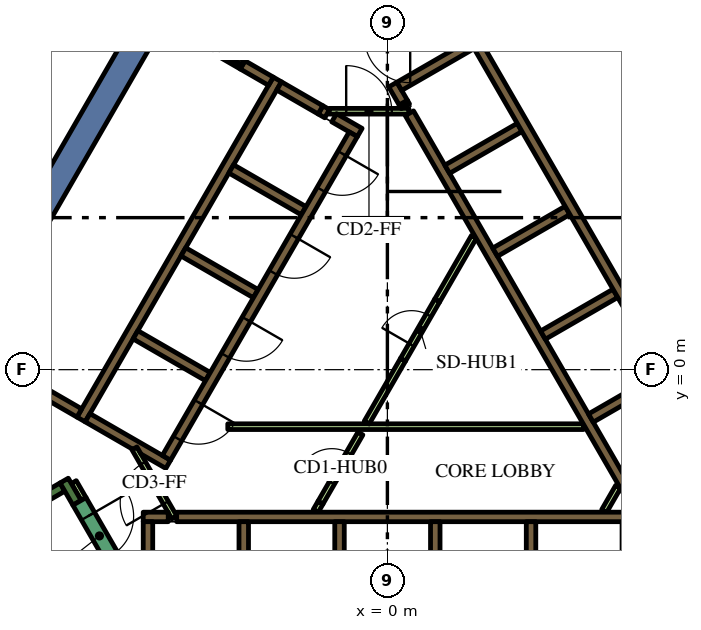
"""IFC4 building model, lengths in metres.
Left out: names, types, materials, properties, quantities, classifications, styles, units other than length and angle.
Written with IfcOpenShell. Run it as: python <this file> out.ifc"""

import sys

from ifc_helpers import new_model, si_unit, direction, frame, frame_2d, origin, place, context, subcontext, project, spatial, polyline, rectangle, outline, extrude, element, fill, save


model = new_model("IFC4")
c1 = context("Model", 3, precision=1e-05, world=origin(), true_north=direction((0.0, 1.0)))
c2 = subcontext(c1, "Body", "Model", "MODEL_VIEW")
j1 = project(units=[si_unit("LENGTHUNIT", "METRE"), si_unit("PLANEANGLEUNIT", "RADIAN")], contexts=[c1])
p1 = place(None, origin())
s1 = spatial("IfcSite", under=j1, at=p1, CompositionType="ELEMENT")
p2 = place(p1, origin())
s2 = spatial("IfcBuilding", under=s1, at=p2, CompositionType="ELEMENT")
p3 = place(p2, frame((0.0, 0.0, 243.6)))
s3 = spatial("IfcBuildingStorey", under=s2, at=p3, CompositionType="ELEMENT", Elevation=243.6)
p4 = place(p3, frame((8.235, 5.736, 0.0), z_axis=(0.0, 0.0, 1.0), x_axis=(-0.499983401189, 0.8660349869, 0.0)))
e1 = element("IfcWall", 1, at=p4, inside=s3, PredefinedType="SOLIDWALL", context=c2, shape_type="SweptSolid", body=[
    extrude(rectangle(XDim=12.472, YDim=0.7, at=frame_2d((6.236, 0.0))), origin(), (0.0, 0.0, 1.0), 4.2),
])
p5 = place(p3, frame((-12.625, -1.867, 0.0), z_axis=(0.0, 0.0, 1.0), x_axis=(0.499996974394, 0.866027150612, 0.0)))
e2 = element("IfcWall", 2, at=p5, inside=s3, PredefinedType="SOLIDWALL", context=c2, shape_type="SweptSolid", body=[
    extrude(rectangle(XDim=15.858, YDim=0.7, at=frame_2d((7.929, 0.0))), origin(), (0.0, 0.0, 1.0), 4.2),
])
p6 = place(p3, frame((-14.44, -6.49, 0.0), z_axis=(0.0, 0.0, 1.0), x_axis=(0.866022966069, 0.500004222222, 0.0)))
e3 = element("IfcWall", 3, at=p6, inside=s3, PredefinedType="SOLIDWALL", context=c2, shape_type="SweptSolid", body=[
    extrude(rectangle(XDim=6.8, YDim=0.25, at=frame_2d((3.4, 0.0))), origin(), (0.0, 0.0, 1.0), 4.2),
])
p7 = place(p3, frame((-8.168, -3.503, 0.0), z_axis=(0.0, 0.0, 1.0), x_axis=(-0.499952099219, 0.866053057547, 0.0)))
e4 = element("IfcWall", 4, at=p7, inside=s3, PredefinedType="SOLIDWALL", context=c2, shape_type="SweptSolid", body=[
    extrude(rectangle(XDim=0.675, YDim=0.25, at=frame_2d((0.337, 0.0))), origin(), (0.0, 0.0, 1.0), 4.2),
])
p8 = place(p3, frame((-5.545, -3.875, 0.0), z_axis=(0.0, 0.0, 1.0), x_axis=(1.0, 0.0, 0.0)))
e5 = element("IfcWall", 5, at=p8, inside=s3, PredefinedType="SOLIDWALL", context=c2, shape_type="SweptSolid", body=[
    extrude(rectangle(XDim=11.97, YDim=0.25, at=frame_2d((5.985, 0.0))), origin(), (0.0, 0.0, 1.0), 4.2),
])
p9 = place(p3, frame((-6.425, -3.875, 0.0), z_axis=(0.0, 0.0, 1.0), x_axis=(1.0, 0.0, 0.0)))
e6 = element("IfcWall", 6, at=p9, inside=s3, PredefinedType="SOLIDWALL", context=c2, shape_type="SweptSolid", body=[
    extrude(rectangle(XDim=0.658, YDim=0.25, at=frame_2d((0.329, 0.0))), origin(), (0.0, 0.0, 1.0), 4.2),
])
for number, where, z_axis, x_axis in (
    (7, (3.78, -4.0, 0.0), (0.0, 0.0, 1.0), (0.0, -1.0, 0.0)),
    (8, (1.26, -4.0, 0.0), (0.0, 0.0, 1.0), (0.0, -1.0, 0.0)),
    (9, (-1.26, -4.0, 0.0), (0.0, 0.0, 1.0), (0.0, -1.0, 0.0)),
    (10, (-3.78, -4.0, 0.0), (0.0, 0.0, 1.0), (0.0, -1.0, 0.0)),
):
    element("IfcWall", number, at=place(p3, frame(where, z_axis=z_axis, x_axis=x_axis)), inside=s3, PredefinedType="SOLIDWALL", context=c2, shape_type="SweptSolid", body=[
        extrude(rectangle(XDim=2.2, YDim=0.25, at=frame_2d((1.1, 0.0))), origin(), (0.0, 0.0, 1.0), 4.2),
    ])
p10 = place(p3, frame((-6.3, -7.125, 0.0), z_axis=(0.0, 0.0, 1.0), x_axis=(0.0, 1.0, 0.0)))
e11 = element("IfcWall", 11, at=p10, inside=s3, PredefinedType="SOLIDWALL", context=c2, shape_type="SweptSolid", body=[
    extrude(rectangle(XDim=3.125, YDim=0.25, at=frame_2d((1.562, 0.0))), origin(), (0.0, 0.0, 1.0), 4.2),
])
p11 = place(p3, frame((0.473, 6.93, 0.0), z_axis=(0.0, 0.0, 1.0), x_axis=(-0.49972245349, 0.866185586049, 0.0)))
e12 = element("IfcWall", 12, at=p11, inside=s3, PredefinedType="SOLIDWALL", context=c2, shape_type="SweptSolid", body=[
    extrude(rectangle(XDim=0.11, YDim=0.25, at=frame_2d((0.055, 0.0))), origin(), (0.0, 0.0, 1.0), 4.2),
])
p12 = place(p3, frame((6.568, -3.627, 0.0), z_axis=(0.0, 0.0, 1.0), x_axis=(-0.499999455981, 0.866025717874, 0.0)))
e13 = element("IfcWall", 13, at=p12, inside=s3, PredefinedType="SOLIDWALL", context=c2, shape_type="SweptSolid", body=[
    extrude(rectangle(XDim=11.978, YDim=0.25, at=frame_2d((5.989, 0.0))), origin(), (0.0, 0.0, 1.0), 4.2),
])
p13 = place(p3, frame((0.417, 7.027, 0.0), z_axis=(0.0, 0.0, 1.0), x_axis=(-0.500210807569, 0.865903659763, 0.0)))
e14 = element("IfcWall", 14, at=p13, inside=s3, PredefinedType="SOLIDWALL", context=c2, shape_type="SweptSolid", body=[
    extrude(rectangle(XDim=0.548, YDim=0.25, at=frame_2d((0.274, 0.0))), origin(), (0.0, 0.0, 1.0), 4.2),
])
p14 = place(p3, frame((3.1, 9.064, 0.0), z_axis=(0.0, 0.0, 1.0), x_axis=(-0.866030133475, -0.499991807846, 0.0)))
e15 = element("IfcWall", 15, at=p14, inside=s3, PredefinedType="SOLIDWALL", context=c2, shape_type="SweptSolid", body=[
    extrude(rectangle(XDim=3.217, YDim=0.25, at=frame_2d((1.608, 0.0))), origin(), (0.0, 0.0, 1.0), 4.2),
])
p15 = place(p3, frame((1.574, 5.274, 0.0), z_axis=(0.0, 0.0, 1.0), x_axis=(0.866028486751, 0.499994660107, 0.0)))
e16 = element("IfcWall", 16, at=p15, inside=s3, PredefinedType="SOLIDWALL", context=c2, shape_type="SweptSolid", body=[
    extrude(rectangle(XDim=2.2, YDim=0.25, at=frame_2d((1.1, 0.0))), origin(), (0.0, 0.0, 1.0), 4.2),
])
for number, where, z_axis, x_axis in (
    (17, (2.834, 3.091, 0.0), (0.0, 0.0, 1.0), (0.866, 0.5, 0.0)),
    (18, (4.094, 0.909, 0.0), (0.0, 0.0, 1.0), (0.866, 0.5, 0.0)),
    (19, (5.354, -1.274, 0.0), (0.0, 0.0, 1.0), (0.866, 0.5, 0.0)),
):
    element("IfcWall", number, at=place(p3, frame(where, z_axis=z_axis, x_axis=x_axis)), inside=s3, PredefinedType="SOLIDWALL", context=c2, shape_type="SweptSolid", body=[
        extrude(rectangle(XDim=2.2, YDim=0.25, at=frame_2d((1.1, 0.0))), origin(), (0.0, 0.0, 1.0), 4.2),
    ])
p16 = place(p3, frame((-8.06, -1.311, 0.0), z_axis=(0.0, 0.0, 1.0), x_axis=(0.50000273126, 0.866023826885, 0.0)))
e20 = element("IfcWall", 20, at=p16, inside=s3, PredefinedType="SOLIDWALL", context=c2, shape_type="SweptSolid", body=[
    extrude(rectangle(XDim=10.33, YDim=0.25, at=frame_2d((5.165, 0.0))), origin(), (0.0, 0.0, 1.0), 4.2),
])
p17 = place(p3, frame((-1.758, 6.835, 0.0), z_axis=(0.0, 0.0, 1.0), x_axis=(0.865982457891, -0.500074377092, 0.0)))
e21 = element("IfcWall", 21, at=p17, inside=s3, PredefinedType="SOLIDWALL", context=c2, shape_type="SweptSolid", body=[
    extrude(rectangle(XDim=0.2, YDim=0.25, at=frame_2d((0.1, 0.0))), origin(), (0.0, 0.0, 1.0), 4.2),
])
p18 = place(p3, frame((-1.76, 6.836, 0.0), z_axis=(0.0, 0.0, 1.0), x_axis=(-0.865952863304, 0.500125622755, 0.0)))
e22 = element("IfcWall", 22, at=p18, inside=s3, PredefinedType="SOLIDWALL", context=c2, shape_type="SweptSolid", body=[
    extrude(rectangle(XDim=1.258, YDim=0.25, at=frame_2d((0.629, 0.0))), origin(), (0.0, 0.0, 1.0), 4.2),
])
p19 = place(p3, frame((-0.728, 6.24, 0.0), z_axis=(0.0, 0.0, 1.0), x_axis=(-0.865955664968, 0.500120771724, 0.0)))
e23 = element("IfcWall", 23, at=p19, inside=s3, PredefinedType="SOLIDWALL", context=c2, shape_type="SweptSolid", body=[
    extrude(rectangle(XDim=0.778, YDim=0.25, at=frame_2d((0.389, 0.0))), origin(), (0.0, 0.0, 1.0), 4.2),
])
for number, where, z_axis, x_axis in (
    (24, (-2.204, 4.182, 0.0), (0.0, 0.0, 1.0), (-0.866, 0.5, 0.0)),
    (25, (-5.369, 3.1, 0.0), (0.0, 0.0, 1.0), (0.866, -0.5, 0.0)),
    (26, (-4.724, -0.182, 0.0), (0.0, 0.0, 1.0), (-0.866, 0.5, 0.0)),
):
    element("IfcWall", number, at=place(p3, frame(where, z_axis=z_axis, x_axis=x_axis)), inside=s3, PredefinedType="SOLIDWALL", context=c2, shape_type="SweptSolid", body=[
        extrude(rectangle(XDim=2.2, YDim=0.25, at=frame_2d((1.1, 0.0))), origin(), (0.0, 0.0, 1.0), 4.2),
    ])
p20 = place(p3, origin())
e27 = element("IfcWall", 27, at=p20, inside=s3, PredefinedType="SOLIDWALL", context=c2, shape_type="SweptSolid", body=[
    extrude(outline(polyline([(-5.922, -2.257), (-5.922, -2.257), (-5.705, -2.382), (-5.83, -2.598), (-6.483, -2.221), (-6.591, -2.033), (-6.591, -2.033), (-6.7, -2.096), (-7.952, -1.373), (-7.827, -1.156), (-5.922, -2.257)])), origin(), (0.0, 0.0, 1.0), 4.2),
])
p21 = place(p3, frame((-8.106, -1.14, 0.0), z_axis=(0.0, 0.0, 1.0), x_axis=(-0.866008981251, 0.500028443584, 0.0)))
e28 = element("IfcWall", 28, at=p21, inside=s3, PredefinedType="SOLIDWALL", context=c2, shape_type="SweptSolid", body=[
    extrude(rectangle(XDim=3.2, YDim=0.25, at=frame_2d((1.6, 0.0))), origin(), (0.0, 0.0, 1.0), 4.2),
])
p22 = place(p3, frame((-3.066, 7.59, 0.0), z_axis=(0.0, 0.0, 1.0), x_axis=(-0.866081358704, 0.49990307071, 0.0)))
e29 = element("IfcWall", 29, at=p22, inside=s3, PredefinedType="SOLIDWALL", context=c2, shape_type="SweptSolid", body=[
    extrude(rectangle(XDim=0.858, YDim=0.25, at=frame_2d((0.429, 0.0))), origin(), (0.0, 0.0, 1.0), 4.2),
])
e30 = element("IfcWall", 30, at=p20, inside=s3, PredefinedType="SOLIDWALL", context=c2, shape_type="SweptSolid", body=[
    extrude(outline(polyline([(-3.748, 8.128), (-3.813, 8.015), (-4.027, 8.139), (-4.017, 8.156), (-4.008, 8.173), (-4.0, 8.192), (-3.995, 8.21), (-3.991, 8.23), (-3.99, 8.25), (-3.99, 8.268), (-3.748, 8.128)])), origin(), (0.0, 0.0, 1.0), 4.2),
])
p23 = place(p3, frame((-8.252, -2.958, 0.0), z_axis=(0.0, 0.0, 1.0), x_axis=(0.500174715838, -0.865924508047, 0.0)))
e31 = element("IfcWall", 31, at=p23, inside=s3, PredefinedType="PARTITIONING", context=c2, shape_type="SweptSolid", body=[
    extrude(rectangle(XDim=0.514, YDim=0.15, at=frame_2d((0.257, 0.0))), origin(), (0.0, 0.0, 1.0), 3.45),
])
p24 = place(p3, frame((5.705, -3.718, 0.0), z_axis=(0.0, 0.0, 1.0), x_axis=(0.499962090823, 0.866047289552, 0.0)))
e32 = element("IfcWall", 32, at=p24, inside=s3, PredefinedType="PARTITIONING", context=c2, shape_type="SweptSolid", body=[
    extrude(rectangle(XDim=0.735, YDim=0.15, at=frame_2d((0.367, 0.0))), origin(), (0.0, 0.0, 1.0), 3.45),
])
p25 = place(p3, frame((-4.2, -1.5, 0.0), z_axis=(0.0, 0.0, 1.0), x_axis=(1.0, 0.0, 0.0)))
e33 = element("IfcWall", 33, at=p25, inside=s3, PredefinedType="PARTITIONING", context=c2, shape_type="SweptSolid", body=[
    extrude(rectangle(XDim=9.359, YDim=0.15, at=frame_2d((4.68, 0.0))), origin(), (0.0, 0.0, 1.0), 3.45),
])
p26 = place(p3, frame((-0.544, -1.393, 0.0), z_axis=(0.0, 0.0, 1.0), x_axis=(0.499928740635, 0.866066541489, 0.0)))
e34 = element("IfcWall", 34, at=p26, inside=s3, PredefinedType="PARTITIONING", context=c2, shape_type="SweptSolid", body=[
    extrude(rectangle(XDim=1.912, YDim=0.15, at=frame_2d((0.956, 0.0))), origin(), (0.0, 0.0, 1.0), 3.45),
])
p27 = place(p3, frame((1.312, 1.822, 0.0), z_axis=(0.0, 0.0, 1.0), x_axis=(0.500003549559, 0.866023354436, 0.0)))
e35 = element("IfcWall", 35, at=p27, inside=s3, PredefinedType="PARTITIONING", context=c2, shape_type="SweptSolid", body=[
    extrude(rectangle(XDim=1.93, YDim=0.15, at=frame_2d((0.965, 0.0))), origin(), (0.0, 0.0, 1.0), 3.45),
])
p28 = place(p3, frame((-1.887, -3.718, 0.0), z_axis=(0.0, 0.0, 1.0), x_axis=(0.500165633897, 0.865929753888, 0.0)))
e36 = element("IfcWall", 36, at=p28, inside=s3, PredefinedType="PARTITIONING", context=c2, shape_type="SweptSolid", body=[
    extrude(rectangle(XDim=0.254, YDim=0.15, at=frame_2d((0.127, 0.0))), origin(), (0.0, 0.0, 1.0), 3.45),
])
p29 = place(p3, frame((8.565, -2.185, 0.0), z_axis=(0.0, 0.0, 1.0), x_axis=(-0.499997954832, 0.866026584559, 0.0)))
e37 = element("IfcWall", 37, at=p29, inside=s3, PredefinedType="SOLIDWALL", context=c2, shape_type="SweptSolid", body=[
    extrude(rectangle(XDim=12.35, YDim=0.25, at=frame_2d((6.175, 0.0))), origin(), (0.0, 0.0, 1.0), 4.2),
])
p30 = place(p29, frame((0.585, 0.0, 0.0)))
e38 = element("IfcOpeningElement", 38, at=p30, cuts=e37, PredefinedType="OPENING", context=c2, shape_type="SweptSolid", body=[
    extrude(rectangle(XDim=1.1, YDim=2.1, at=frame_2d((0.55, 1.05))), frame((0.0, 0.135, 0.0), z_axis=(0.0, -1.0, 0.0), x_axis=(1.0, 0.0, 0.0)), (0.0, 0.0, 1.0), 0.27),
])
p31 = place(p3, frame((-0.898, 6.194, 0.0), z_axis=(0.0, 0.0, 1.0), x_axis=(-0.499996202215, -0.866027596426, 0.0)))
e39 = element("IfcWall", 39, at=p31, inside=s3, PredefinedType="SOLIDWALL", context=c2, shape_type="SweptSolid", body=[
    extrude(rectangle(XDim=9.83, YDim=0.25, at=frame_2d((4.915, 0.0))), origin(), (0.0, 0.0, 1.0), 4.2),
])
p32 = place(p31, frame((0.585, 0.0, 0.0)))
e40 = element("IfcOpeningElement", 40, at=p32, cuts=e39, PredefinedType="OPENING", context=c2, shape_type="SweptSolid", body=[
    extrude(rectangle(XDim=1.1, YDim=2.1, at=frame_2d((0.55, 1.05))), frame((0.0, 0.135, 0.0), z_axis=(0.0, -1.0, 0.0), x_axis=(1.0, 0.0, 0.0)), (0.0, 0.0, 1.0), 0.27),
])
p33 = place(p31, frame((3.105, 0.0, 0.0)))
e41 = element("IfcOpeningElement", 41, at=p33, cuts=e39, PredefinedType="OPENING", context=c2, shape_type="SweptSolid", body=[
    extrude(rectangle(XDim=1.1, YDim=2.1, at=frame_2d((0.55, 1.05))), frame((0.0, 0.135, 0.0), z_axis=(0.0, -1.0, 0.0), x_axis=(1.0, 0.0, 0.0)), (0.0, 0.0, 1.0), 0.27),
])
p34 = place(p31, frame((5.625, 0.0, 0.0)))
e42 = element("IfcOpeningElement", 42, at=p34, cuts=e39, PredefinedType="OPENING", context=c2, shape_type="SweptSolid", body=[
    extrude(rectangle(XDim=1.1, YDim=2.1, at=frame_2d((0.55, 1.05))), frame((0.0, 0.135, 0.0), z_axis=(0.0, -1.0, 0.0), x_axis=(1.0, 0.0, 0.0)), (0.0, 0.0, 1.0), 0.27),
])
p35 = place(p31, frame((8.145, 0.0, 0.0)))
e43 = element("IfcOpeningElement", 43, at=p35, cuts=e39, PredefinedType="OPENING", context=c2, shape_type="SweptSolid", body=[
    extrude(rectangle(XDim=1.1, YDim=2.1, at=frame_2d((0.55, 1.05))), frame((0.0, 0.135, 0.0), z_axis=(0.0, -1.0, 0.0), x_axis=(1.0, 0.0, 0.0)), (0.0, 0.0, 1.0), 0.27),
])
p36 = place(p3, frame((-8.103, -3.466, 0.0), z_axis=(0.0, 0.0, 1.0), x_axis=(0.500078061341, -0.865980330357, 0.0)))
e44 = element("IfcWall", 44, at=p36, inside=s3, PredefinedType="SOLIDWALL", context=c2, shape_type="SweptSolid", body=[
    extrude(rectangle(XDim=2.1, YDim=0.4, at=frame_2d((1.05, 0.0))), origin(), (0.0, 0.0, 1.0), 4.2),
])
p37 = place(p36, frame((0.45, 0.0, 0.0)))
e45 = element("IfcOpeningElement", 45, at=p37, cuts=e44, PredefinedType="OPENING", context=c2, shape_type="SweptSolid", body=[
    extrude(rectangle(XDim=1.2, YDim=2.1, at=frame_2d((0.6, 1.05))), frame((0.0, 0.21, 0.0), z_axis=(0.0, -1.0, 0.0), x_axis=(1.0, 0.0, 0.0)), (0.0, 0.0, 1.0), 0.42),
])
p38 = place(p3, frame((-1.76, -3.498, 0.0), z_axis=(0.0, 0.0, 1.0), x_axis=(0.499977374825, 0.866038466041, 0.0)))
e46 = element("IfcWall", 46, at=p38, inside=s3, PredefinedType="PARTITIONING", context=c2, shape_type="SweptSolid", body=[
    extrude(rectangle(XDim=2.1, YDim=0.15, at=frame_2d((1.05, 0.0))), origin(), (0.0, 0.0, 1.0), 3.45),
])
p39 = place(p38, frame((0.6, 0.0, 0.0)))
e47 = element("IfcOpeningElement", 47, at=p39, cuts=e46, PredefinedType="OPENING", context=c2, shape_type="SweptSolid", body=[
    extrude(rectangle(XDim=0.9, YDim=2.1, at=frame_2d((0.45, 1.05))), frame((0.0, 0.085, 0.0), z_axis=(0.0, -1.0, 0.0), x_axis=(1.0, 0.0, 0.0)), (0.0, 0.0, 1.0), 0.17),
])
p40 = place(p3, frame((-1.534, 6.8, 0.0), z_axis=(0.0, 0.0, 1.0), x_axis=(1.0, 0.0, 0.0)))
e48 = element("IfcWall", 48, at=p40, inside=s3, PredefinedType="PARTITIONING", context=c2, shape_type="SweptSolid", body=[
    extrude(rectangle(XDim=2.1, YDim=0.15, at=frame_2d((1.05, 0.0))), origin(), (0.0, 0.0, 1.0), 3.45),
])
p41 = place(p40, frame((0.45, 0.0, 0.0)))
e49 = element("IfcOpeningElement", 49, at=p41, cuts=e48, PredefinedType="OPENING", context=c2, shape_type="SweptSolid", body=[
    extrude(rectangle(XDim=1.2, YDim=2.1, at=frame_2d((0.6, 1.05))), frame((0.0, 0.085, 0.0), z_axis=(0.0, -1.0, 0.0), x_axis=(1.0, 0.0, 0.0)), (0.0, 0.0, 1.0), 0.17),
])
p42 = place(p3, frame((-5.606, -3.89, 0.0), z_axis=(0.0, 0.0, 1.0), x_axis=(-0.500027713859, 0.866009402589, 0.0)))
e50 = element("IfcWall", 50, at=p42, inside=s3, PredefinedType="PARTITIONING", context=c2, shape_type="SweptSolid", body=[
    extrude(rectangle(XDim=2.1, YDim=0.15, at=frame_2d((1.05, 0.0))), origin(), (0.0, 0.0, 1.0), 3.45),
])
p43 = place(p42, frame((0.45, 0.0, 0.0)))
e51 = element("IfcOpeningElement", 51, at=p43, cuts=e50, PredefinedType="OPENING", context=c2, shape_type="SweptSolid", body=[
    extrude(rectangle(XDim=1.2, YDim=2.1, at=frame_2d((0.6, 1.05))), frame((0.0, 0.085, 0.0), z_axis=(0.0, -1.0, 0.0), x_axis=(1.0, 0.0, 0.0)), (0.0, 0.0, 1.0), 0.17),
])
p44 = place(p3, frame((-5.659, 9.012, 0.0), z_axis=(0.0, 0.0, 1.0), x_axis=(0.866009402589, -0.500027713859, 0.0)))
e52 = element("IfcWall", 52, at=p44, inside=s3, PredefinedType="PARTITIONING", context=c2, shape_type="SweptSolid", body=[
    extrude(rectangle(XDim=2.1, YDim=0.12, at=frame_2d((1.05, 0.0))), origin(), (0.0, 0.0, 1.0), 3.45),
])
p45 = place(p44, frame((0.45, 0.0, 0.0)))
e53 = element("IfcOpeningElement", 53, at=p45, cuts=e52, PredefinedType="OPENING", context=c2, shape_type="SweptSolid", body=[
    extrude(rectangle(XDim=1.2, YDim=2.1, at=frame_2d((0.6, 1.05))), frame((0.0, 0.07, 0.0), z_axis=(0.0, -1.0, 0.0), x_axis=(1.0, 0.0, 0.0)), (0.0, 0.0, 1.0), 0.14),
])
p46 = place(p3, frame((0.412, 0.263, 0.0), z_axis=(0.0, 0.0, 1.0), x_axis=(0.500062916607, 0.865989075817, 0.0)))
e54 = element("IfcWall", 54, at=p46, inside=s3, PredefinedType="PARTITIONING", context=c2, shape_type="SweptSolid", body=[
    extrude(rectangle(XDim=1.8, YDim=0.15, at=frame_2d((0.9, 0.0))), origin(), (0.0, 0.0, 1.0), 3.45),
])
p47 = place(p46, frame((0.45, 0.0, 0.0)))
e55 = element("IfcOpeningElement", 55, at=p47, cuts=e54, PredefinedType="OPENING", context=c2, shape_type="SweptSolid", body=[
    extrude(rectangle(XDim=0.9, YDim=2.1, at=frame_2d((0.45, 1.05))), frame((0.0, 0.085, 0.0), z_axis=(0.0, -1.0, 0.0), x_axis=(1.0, 0.0, 0.0)), (0.0, 0.0, 1.0), 0.17),
])
p48 = place(p3, frame((-7.364, 11.545, 0.0), z_axis=(0.0, 0.0, 1.0), x_axis=(-0.500001759768, -0.86602438778, 0.0)))
e56 = element("IfcWall", 56, at=p48, inside=s3, PredefinedType="PARTITIONING", context=c2, shape_type="SweptSolid", body=[
    extrude(rectangle(XDim=13.317, YDim=0.2, at=frame_2d((6.658, 0.0))), origin(), (0.0, 0.0, 1.0), 3.45),
])
p49 = place(p48, frame((6.2, 0.0, 0.0)))
e57 = element("IfcOpeningElement", 57, at=p49, cuts=e56, PredefinedType="OPENING", context=c2, shape_type="SweptSolid", body=[
    extrude(rectangle(XDim=1.0, YDim=2.1, at=frame_2d((0.5, 1.05))), frame((0.0, 0.11, 0.0), z_axis=(0.0, -1.0, 0.0), x_axis=(1.0, 0.0, 0.0)), (0.0, 0.0, 1.0), 0.22),
])
p50 = place(p32, origin())
e58 = element("IfcDoor", 58, at=p50, inside=s3, OperationType="DOUBLE_DOOR_SLIDING", PredefinedType="DOOR", context=c2, shape_type="SweptSolid", body=[
    extrude(rectangle(XDim=1.1, YDim=2.1, at=frame_2d((0.55, 1.05))), frame((0.0, 0.025, 0.0), z_axis=(0.0, -1.0, 0.0), x_axis=(1.0, 0.0, 0.0)), (0.0, 0.0, 1.0), 0.05),
])
fill(e40, e58)
p51 = place(p33, origin())
e59 = element("IfcDoor", 59, at=p51, inside=s3, OperationType="DOUBLE_DOOR_SLIDING", PredefinedType="DOOR", context=c2, shape_type="SweptSolid", body=[
    extrude(rectangle(XDim=1.1, YDim=2.1, at=frame_2d((0.55, 1.05))), frame((0.0, 0.025, 0.0), z_axis=(0.0, -1.0, 0.0), x_axis=(1.0, 0.0, 0.0)), (0.0, 0.0, 1.0), 0.05),
])
fill(e41, e59)
p52 = place(p34, origin())
e60 = element("IfcDoor", 60, at=p52, inside=s3, OperationType="DOUBLE_DOOR_SLIDING", PredefinedType="DOOR", context=c2, shape_type="SweptSolid", body=[
    extrude(rectangle(XDim=1.1, YDim=2.1, at=frame_2d((0.55, 1.05))), frame((0.0, 0.025, 0.0), z_axis=(0.0, -1.0, 0.0), x_axis=(1.0, 0.0, 0.0)), (0.0, 0.0, 1.0), 0.05),
])
fill(e42, e60)
p53 = place(p35, origin())
e61 = element("IfcDoor", 61, at=p53, inside=s3, OperationType="DOUBLE_DOOR_SLIDING", PredefinedType="DOOR", context=c2, shape_type="SweptSolid", body=[
    extrude(rectangle(XDim=1.1, YDim=2.1, at=frame_2d((0.55, 1.05))), frame((0.0, 0.025, 0.0), z_axis=(0.0, -1.0, 0.0), x_axis=(1.0, 0.0, 0.0)), (0.0, 0.0, 1.0), 0.05),
])
fill(e43, e61)
p54 = place(p37, origin())
e62 = element("IfcDoor", 62, at=p54, inside=s3, OperationType="SINGLE_SWING_LEFT", PredefinedType="DOOR", context=c2, shape_type="SweptSolid", body=[
    extrude(rectangle(XDim=1.2, YDim=2.1, at=frame_2d((0.6, 1.05))), frame((0.0, 0.025, 0.0), z_axis=(0.0, -1.0, 0.0), x_axis=(1.0, 0.0, 0.0)), (0.0, 0.0, 1.0), 0.05),
])
fill(e45, e62)
p55 = place(p39, origin())
e63 = element("IfcDoor", 63, at=p55, inside=s3, OperationType="SINGLE_SWING_LEFT", PredefinedType="DOOR", context=c2, shape_type="SweptSolid", body=[
    extrude(rectangle(XDim=0.9, YDim=2.1, at=frame_2d((0.45, 1.05))), frame((0.0, 0.025, 0.0), z_axis=(0.0, -1.0, 0.0), x_axis=(1.0, 0.0, 0.0)), (0.0, 0.0, 1.0), 0.05),
])
fill(e47, e63)
p56 = place(p41, origin())
e64 = element("IfcDoor", 64, at=p56, inside=s3, OperationType="SINGLE_SWING_LEFT", PredefinedType="DOOR", context=c2, shape_type="SweptSolid", body=[
    extrude(rectangle(XDim=1.2, YDim=2.1, at=frame_2d((0.6, 1.05))), frame((0.0, 0.025, 0.0), z_axis=(0.0, -1.0, 0.0), x_axis=(1.0, 0.0, 0.0)), (0.0, 0.0, 1.0), 0.05),
])
fill(e49, e64)
p57 = place(p43, origin())
e65 = element("IfcDoor", 65, at=p57, inside=s3, OperationType="SINGLE_SWING_LEFT", PredefinedType="DOOR", context=c2, shape_type="SweptSolid", body=[
    extrude(rectangle(XDim=1.2, YDim=2.1, at=frame_2d((0.6, 1.05))), frame((0.0, 0.025, 0.0), z_axis=(0.0, -1.0, 0.0), x_axis=(1.0, 0.0, 0.0)), (0.0, 0.0, 1.0), 0.05),
])
fill(e51, e65)
p58 = place(p45, origin())
e66 = element("IfcDoor", 66, at=p58, inside=s3, OperationType="SINGLE_SWING_LEFT", PredefinedType="DOOR", context=c2, shape_type="SweptSolid", body=[
    extrude(rectangle(XDim=1.2, YDim=2.1, at=frame_2d((0.6, 1.05))), frame((0.0, 0.025, 0.0), z_axis=(0.0, -1.0, 0.0), x_axis=(1.0, 0.0, 0.0)), (0.0, 0.0, 1.0), 0.05),
])
fill(e53, e66)
p59 = place(p47, origin())
e67 = element("IfcDoor", 67, at=p59, inside=s3, OperationType="SINGLE_SWING_LEFT", PredefinedType="DOOR", context=c2, shape_type="SweptSolid", body=[
    extrude(rectangle(XDim=0.9, YDim=2.1, at=frame_2d((0.45, 1.05))), frame((0.0, 0.025, 0.0), z_axis=(0.0, -1.0, 0.0), x_axis=(1.0, 0.0, 0.0)), (0.0, 0.0, 1.0), 0.05),
])
fill(e55, e67)
save(model, sys.argv[1])
